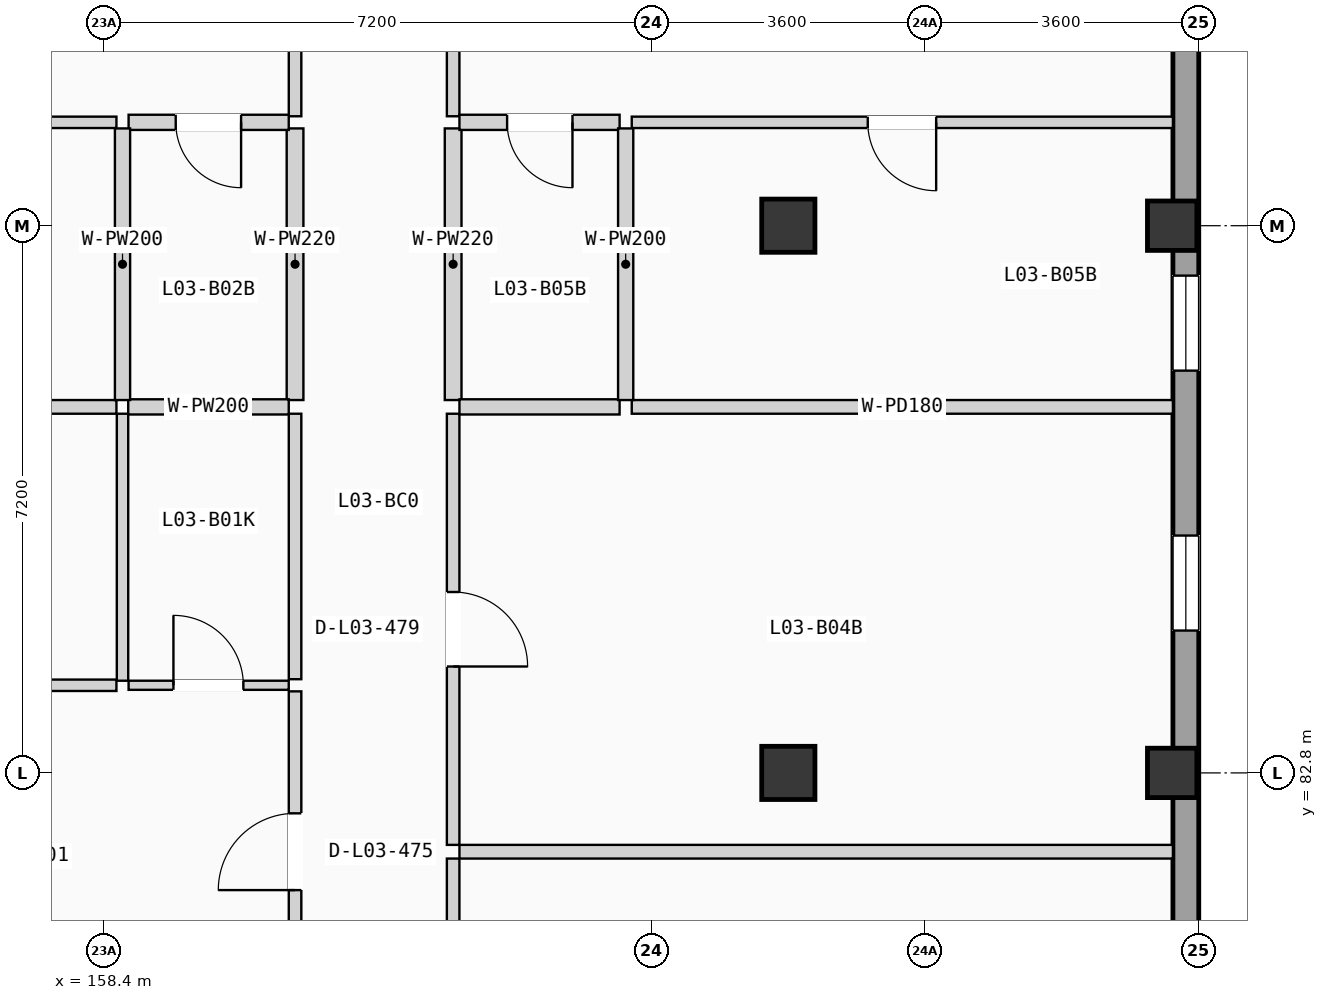
"""IFC4 building model, lengths in metres.
Left out: names, types, materials, properties, quantities, classifications, styles, units other than length and angle.
Written with IfcOpenShell. Run it as: python <this file> out.ifc"""

import sys

from ifc_helpers import new_model, si_unit, direction, frame, frame_2d, origin, origin_2d, place, context, subcontext, project, spatial, rectangle, extrude, element, fill, save


model = new_model("IFC4")
c1 = context("Model", 3, precision=1e-05, world=origin(), true_north=direction((0.0, 1.0)))
c2 = subcontext(c1, "Body", "Model", "MODEL_VIEW")
j1 = project(units=[si_unit("LENGTHUNIT", "METRE"), si_unit("PLANEANGLEUNIT", "RADIAN")], contexts=[c1])
p1 = place(None, origin())
s1 = spatial("IfcSite", under=j1, at=p1, CompositionType="ELEMENT")
p2 = place(p1, origin())
s2 = spatial("IfcBuilding", under=s1, at=p2, CompositionType="ELEMENT")
p3 = place(p2, frame((0.0, 0.0, 12.075)))
s3 = spatial("IfcBuildingStorey", under=s2, at=p3, CompositionType="ELEMENT", Elevation=12.075)
for number, where, z_axis, x_axis in (
    (1, (167.4, 82.8, 0.0), (0.0, 0.0, 1.0), (1.0, 0.0, 0.0)),
    (2, (167.4, 90.0, 0.0), (0.0, 0.0, 1.0), (1.0, 0.0, 0.0)),
):
    element("IfcColumn", number, at=place(p3, frame(where, z_axis=z_axis, x_axis=x_axis)), inside=s3, PredefinedType="COLUMN", context=c2, shape_type="SweptSolid", body=[
        extrude(rectangle(XDim=0.7, YDim=0.7, at=origin_2d()), origin(), (0.0, 0.0, 1.0), 3.15),
    ])
for number, where, z_axis, x_axis in (
    (3, (172.45, 82.8, 0.0), (0.0, 0.0, 1.0), (1.0, 0.0, 0.0)),
    (4, (172.45, 90.0, 0.0), (0.0, 0.0, 1.0), (1.0, 0.0, 0.0)),
):
    element("IfcColumn", number, at=place(p3, frame(where, z_axis=z_axis, x_axis=x_axis)), inside=s3, PredefinedType="COLUMN", context=c2, shape_type="SweptSolid", body=[
        extrude(rectangle(XDim=0.65, YDim=0.65, at=origin_2d()), origin(), (0.0, 0.0, 1.0), 3.15),
    ])
p4 = place(p3, frame((172.63, 68.74, 0.0), z_axis=(0.0, 0.0, 1.0), x_axis=(0.0, 1.0, 0.0)))
e5 = element("IfcWall", 5, at=p4, inside=s3, PredefinedType="SOLIDWALL", context=c2, shape_type="SweptSolid", body=[
    extrude(rectangle(XDim=49.72, YDim=0.34, at=frame_2d((24.86, 0.0))), origin(), (0.0, 0.0, 1.0), 2.89),
])
p5 = place(p4, frame((9.472, 0.0, 0.9)))
e6 = element("IfcOpeningElement", 6, at=p5, cuts=e5, PredefinedType="OPENING", context=c2, shape_type="SweptSolid", body=[
    extrude(rectangle(XDim=1.25, YDim=1.2, at=frame_2d((0.625, 0.6))), frame((0.0, 0.18, 0.0), z_axis=(0.0, -1.0, 0.0), x_axis=(1.0, 0.0, 0.0)), (0.0, 0.0, 1.0), 0.36),
])
p6 = place(p4, frame((15.933, 0.0, 0.855)))
e7 = element("IfcOpeningElement", 7, at=p6, cuts=e5, PredefinedType="OPENING", context=c2, shape_type="SweptSolid", body=[
    extrude(rectangle(XDim=1.25, YDim=1.35, at=frame_2d((0.625, 0.675))), frame((0.0, 0.18, 0.0), z_axis=(0.0, -1.0, 0.0), x_axis=(1.0, 0.0, 0.0)), (0.0, 0.0, 1.0), 0.36),
])
p7 = place(p4, frame((24.235, 0.0, 0.705)))
e8 = element("IfcOpeningElement", 8, at=p7, cuts=e5, PredefinedType="OPENING", context=c2, shape_type="SweptSolid", body=[
    extrude(rectangle(XDim=1.25, YDim=1.5, at=frame_2d((0.625, 0.75))), frame((0.0, 0.18, 0.0), z_axis=(0.0, -1.0, 0.0), x_axis=(1.0, 0.0, 0.0)), (0.0, 0.0, 1.0), 0.36),
])
p8 = place(p4, frame((19.353, 0.0, 0.555)))
e9 = element("IfcOpeningElement", 9, at=p8, cuts=e5, PredefinedType="OPENING", context=c2, shape_type="SweptSolid", body=[
    extrude(rectangle(XDim=1.25, YDim=1.65, at=frame_2d((0.625, 0.825))), frame((0.0, 0.18, 0.0), z_axis=(0.0, -1.0, 0.0), x_axis=(1.0, 0.0, 0.0)), (0.0, 0.0, 1.0), 0.36),
])
p9 = place(p4, frame((29.267, 0.0, 0.85)))
e10 = element("IfcOpeningElement", 10, at=p9, cuts=e5, PredefinedType="OPENING", context=c2, shape_type="SweptSolid", body=[
    extrude(rectangle(XDim=0.95, YDim=1.2, at=frame_2d((0.475, 0.6))), frame((0.0, 0.18, 0.0), z_axis=(0.0, -1.0, 0.0), x_axis=(1.0, 0.0, 0.0)), (0.0, 0.0, 1.0), 0.36),
])
p10 = place(p4, frame((36.694, 0.0, 0.9)))
e11 = element("IfcOpeningElement", 11, at=p10, cuts=e5, PredefinedType="OPENING", context=c2, shape_type="SweptSolid", body=[
    extrude(rectangle(XDim=1.35, YDim=1.2, at=frame_2d((0.675, 0.6))), frame((0.0, 0.18, 0.0), z_axis=(0.0, -1.0, 0.0), x_axis=(1.0, 0.0, 0.0)), (0.0, 0.0, 1.0), 0.36),
])
p11 = place(p4, frame((32.006, 0.0, 0.855)))
e12 = element("IfcOpeningElement", 12, at=p11, cuts=e5, PredefinedType="OPENING", context=c2, shape_type="SweptSolid", body=[
    extrude(rectangle(XDim=1.35, YDim=1.35, at=frame_2d((0.675, 0.675))), frame((0.0, 0.18, 0.0), z_axis=(0.0, -1.0, 0.0), x_axis=(1.0, 0.0, 0.0)), (0.0, 0.0, 1.0), 0.36),
])
p12 = place(p4, frame((40.038, 0.0, 0.705)))
e13 = element("IfcOpeningElement", 13, at=p12, cuts=e5, PredefinedType="OPENING", context=c2, shape_type="SweptSolid", body=[
    extrude(rectangle(XDim=1.35, YDim=1.5, at=frame_2d((0.675, 0.75))), frame((0.0, 0.18, 0.0), z_axis=(0.0, -1.0, 0.0), x_axis=(1.0, 0.0, 0.0)), (0.0, 0.0, 1.0), 0.36),
])
p13 = place(p3, frame((160.91, 79.653, 0.0), z_axis=(0.0, 0.0, 1.0), x_axis=(0.0, 1.0, 0.0)))
e14 = element("IfcWall", 14, at=p13, inside=s3, PredefinedType="PARTITIONING", context=c2, shape_type="SweptSolid", body=[
    extrude(rectangle(XDim=4.22, YDim=0.165, at=frame_2d((2.11, 0.0))), origin(), (0.0, 0.0, 1.0), 2.87),
])
p14 = place(p13, frame((1.605, 0.0, 0.0)))
e15 = element("IfcOpeningElement", 15, at=p14, cuts=e14, PredefinedType="OPENING", context=c2, shape_type="SweptSolid", body=[
    extrude(rectangle(XDim=1.01, YDim=2.11, at=frame_2d((0.505, 1.055))), frame((0.0, 0.093, 0.0), z_axis=(0.0, -1.0, 0.0), x_axis=(1.0, 0.0, 0.0)), (0.0, 0.0, 1.0), 0.185),
])
p15 = place(p3, frame((160.91, 84.033, 0.0), z_axis=(0.0, 0.0, 1.0), x_axis=(0.0, 1.0, 0.0)))
e16 = element("IfcWall", 16, at=p15, inside=s3, PredefinedType="PARTITIONING", context=c2, shape_type="SweptSolid", body=[
    extrude(rectangle(XDim=3.493, YDim=0.165, at=frame_2d((1.747, 0.0))), origin(), (0.0, 0.0, 1.0), 2.87),
])
p16 = place(p3, frame((160.91, 91.44, 0.0), z_axis=(0.0, 0.0, 1.0), x_axis=(0.0, 1.0, 0.0)))
e17 = element("IfcWall", 17, at=p16, inside=s3, PredefinedType="PARTITIONING", context=c2, shape_type="SweptSolid", body=[
    extrude(rectangle(XDim=4.32, YDim=0.165, at=frame_2d((2.16, 0.0))), origin(), (0.0, 0.0, 1.0), 2.87),
])
p17 = place(p16, frame((1.655, 0.0, 0.0)))
e18 = element("IfcOpeningElement", 18, at=p17, cuts=e17, PredefinedType="OPENING", context=c2, shape_type="SweptSolid", body=[
    extrude(rectangle(XDim=1.01, YDim=2.11, at=frame_2d((0.505, 1.055))), frame((0.0, 0.093, 0.0), z_axis=(0.0, -1.0, 0.0), x_axis=(1.0, 0.0, 0.0)), (0.0, 0.0, 1.0), 0.185),
])
p18 = place(p3, frame((160.91, 87.706, 0.0), z_axis=(0.0, 0.0, 1.0), x_axis=(0.0, 1.0, 0.0)))
e19 = element("IfcWall", 19, at=p18, inside=s3, PredefinedType="PLUMBINGWALL", context=c2, shape_type="SweptSolid", body=[
    extrude(rectangle(XDim=3.574, YDim=0.22, at=frame_2d((1.787, 0.0))), origin(), (0.0, 0.0, 1.0), 2.87),
])
p19 = place(p3, frame((162.99, 75.945, 0.0), z_axis=(0.0, 0.0, 1.0), x_axis=(0.0, 1.0, 0.0)))
e20 = element("IfcWall", 20, at=p19, inside=s3, PredefinedType="PARTITIONING", context=c2, shape_type="SweptSolid", body=[
    extrude(rectangle(XDim=5.728, YDim=0.165, at=frame_2d((2.864, 0.0))), origin(), (0.0, 0.0, 1.0), 2.87),
])
p20 = place(p19, frame((2.402, 0.0, 0.0)))
e21 = element("IfcOpeningElement", 21, at=p20, cuts=e20, PredefinedType="OPENING", context=c2, shape_type="SweptSolid", body=[
    extrude(rectangle(XDim=0.98, YDim=2.08, at=frame_2d((0.49, 1.04))), frame((0.0, 0.093, 0.0), z_axis=(0.0, -1.0, 0.0), x_axis=(1.0, 0.0, 0.0)), (0.0, 0.0, 1.0), 0.185),
])
p21 = place(p3, frame((162.99, 81.853, 0.0), z_axis=(0.0, 0.0, 1.0), x_axis=(0.0, 1.0, 0.0)))
e22 = element("IfcWall", 22, at=p21, inside=s3, PredefinedType="PARTITIONING", context=c2, shape_type="SweptSolid", body=[
    extrude(rectangle(XDim=5.673, YDim=0.165, at=frame_2d((2.836, 0.0))), origin(), (0.0, 0.0, 1.0), 2.87),
])
p22 = place(p21, frame((2.347, 0.0, 0.0)))
e23 = element("IfcOpeningElement", 23, at=p22, cuts=e22, PredefinedType="OPENING", context=c2, shape_type="SweptSolid", body=[
    extrude(rectangle(XDim=0.98, YDim=2.08, at=frame_2d((0.49, 1.04))), frame((0.0, 0.093, 0.0), z_axis=(0.0, -1.0, 0.0), x_axis=(1.0, 0.0, 0.0)), (0.0, 0.0, 1.0), 0.185),
])
p23 = place(p3, frame((162.99, 91.44, 0.0), z_axis=(0.0, 0.0, 1.0), x_axis=(0.0, 1.0, 0.0)))
e24 = element("IfcWall", 24, at=p23, inside=s3, PredefinedType="PARTITIONING", context=c2, shape_type="SweptSolid", body=[
    extrude(rectangle(XDim=4.32, YDim=0.165, at=frame_2d((2.16, 0.0))), origin(), (0.0, 0.0, 1.0), 2.87),
])
p24 = place(p23, frame((1.655, 0.0, 0.0)))
e25 = element("IfcOpeningElement", 25, at=p24, cuts=e24, PredefinedType="OPENING", context=c2, shape_type="SweptSolid", body=[
    extrude(rectangle(XDim=1.01, YDim=2.11, at=frame_2d((0.505, 1.055))), frame((0.0, 0.093, 0.0), z_axis=(0.0, -1.0, 0.0), x_axis=(1.0, 0.0, 0.0)), (0.0, 0.0, 1.0), 0.185),
])
p25 = place(p3, frame((162.99, 87.706, 0.0), z_axis=(0.0, 0.0, 1.0), x_axis=(0.0, 1.0, 0.0)))
e26 = element("IfcWall", 26, at=p25, inside=s3, PredefinedType="PLUMBINGWALL", context=c2, shape_type="SweptSolid", body=[
    extrude(rectangle(XDim=3.574, YDim=0.22, at=frame_2d((1.787, 0.0))), origin(), (0.0, 0.0, 1.0), 2.87),
])
p26 = place(p3, frame((158.72, 83.953, 0.0), z_axis=(0.0, 0.0, 1.0), x_axis=(1.0, 0.0, 0.0)))
e27 = element("IfcWall", 27, at=p26, inside=s3, PredefinedType="PARTITIONING", context=c2, shape_type="SweptSolid", body=[
    extrude(rectangle(XDim=2.107, YDim=0.12, at=frame_2d((1.053, 0.0))), origin(), (0.0, 0.0, 1.0), 2.87),
])
p27 = place(p26, frame((0.59, 0.0, 0.0)))
e28 = element("IfcOpeningElement", 28, at=p27, cuts=e27, PredefinedType="OPENING", context=c2, shape_type="SweptSolid", body=[
    extrude(rectangle(XDim=0.92, YDim=2.02, at=frame_2d((0.46, 1.01))), frame((0.0, 0.07, 0.0), z_axis=(0.0, -1.0, 0.0), x_axis=(1.0, 0.0, 0.0)), (0.0, 0.0, 1.0), 0.14),
])
p28 = place(p3, frame((151.54, 83.953, 0.0), z_axis=(0.0, 0.0, 1.0), x_axis=(1.0, 0.0, 0.0)))
e29 = element("IfcWall", 29, at=p28, inside=s3, PredefinedType="PARTITIONING", context=c2, shape_type="SweptSolid", body=[
    extrude(rectangle(XDim=7.02, YDim=0.15, at=frame_2d((3.51, 0.0))), origin(), (0.0, 0.0, 1.0), 2.87),
])
p29 = place(p28, frame((3.015, 0.0, 0.0)))
e30 = element("IfcOpeningElement", 30, at=p29, cuts=e29, PredefinedType="OPENING", context=c2, shape_type="SweptSolid", body=[
    extrude(rectangle(XDim=1.0, YDim=2.06, at=frame_2d((0.5, 1.03))), frame((0.0, 0.085, 0.0), z_axis=(0.0, -1.0, 0.0), x_axis=(1.0, 0.0, 0.0)), (0.0, 0.0, 1.0), 0.17),
])
p30 = place(p3, frame((158.64, 84.013, 0.0), z_axis=(0.0, 0.0, 1.0), x_axis=(0.0, 1.0, 0.0)))
e31 = element("IfcWall", 31, at=p30, inside=s3, PredefinedType="PARTITIONING", context=c2, shape_type="SweptSolid", body=[
    extrude(rectangle(XDim=3.513, YDim=0.15, at=frame_2d((1.756, 0.0))), origin(), (0.0, 0.0, 1.0), 2.87),
])
p31 = place(p3, frame((158.715, 87.616, 0.0), z_axis=(0.0, 0.0, 1.0), x_axis=(1.0, 0.0, 0.0)))
e32 = element("IfcWall", 32, at=p31, inside=s3, PredefinedType="PLUMBINGWALL", context=c2, shape_type="SweptSolid", body=[
    extrude(rectangle(XDim=2.112, YDim=0.2, at=frame_2d((1.056, 0.0))), origin(), (0.0, 0.0, 1.0), 2.87),
])
p32 = place(p3, frame((151.54, 87.616, 0.0), z_axis=(0.0, 0.0, 1.0), x_axis=(1.0, 0.0, 0.0)))
e33 = element("IfcWall", 33, at=p32, inside=s3, PredefinedType="PARTITIONING", context=c2, shape_type="SweptSolid", body=[
    extrude(rectangle(XDim=7.02, YDim=0.18, at=frame_2d((3.51, 0.0))), origin(), (0.0, 0.0, 1.0), 2.87),
])
p33 = place(p3, frame((158.72, 91.36, 0.0), z_axis=(0.0, 0.0, 1.0), x_axis=(1.0, 0.0, 0.0)))
e34 = element("IfcWall", 34, at=p33, inside=s3, PredefinedType="PLUMBINGWALL", context=c2, shape_type="SweptSolid", body=[
    extrude(rectangle(XDim=2.107, YDim=0.2, at=frame_2d((1.053, 0.0))), origin(), (0.0, 0.0, 1.0), 2.87),
])
p34 = place(p33, frame((0.62, 0.0, 0.0)))
e35 = element("IfcOpeningElement", 35, at=p34, cuts=e34, PredefinedType="OPENING", context=c2, shape_type="SweptSolid", body=[
    extrude(rectangle(XDim=0.86, YDim=2.0, at=frame_2d((0.43, 1.0))), frame((0.0, 0.11, 0.0), z_axis=(0.0, -1.0, 0.0), x_axis=(1.0, 0.0, 0.0)), (0.0, 0.0, 1.0), 0.22),
])
p35 = place(p3, frame((151.54, 91.36, 0.0), z_axis=(0.0, 0.0, 1.0), x_axis=(1.0, 0.0, 0.0)))
e36 = element("IfcWall", 36, at=p35, inside=s3, PredefinedType="PARTITIONING", context=c2, shape_type="SweptSolid", body=[
    extrude(rectangle(XDim=7.02, YDim=0.15, at=frame_2d((3.51, 0.0))), origin(), (0.0, 0.0, 1.0), 2.87),
])
p36 = place(p35, frame((3.045, 0.0, 0.0)))
e37 = element("IfcOpeningElement", 37, at=p36, cuts=e36, PredefinedType="OPENING", context=c2, shape_type="SweptSolid", body=[
    extrude(rectangle(XDim=0.94, YDim=2.06, at=frame_2d((0.47, 1.03))), frame((0.0, 0.085, 0.0), z_axis=(0.0, -1.0, 0.0), x_axis=(1.0, 0.0, 0.0)), (0.0, 0.0, 1.0), 0.17),
])
p37 = place(p3, frame((158.64, 87.706, 0.0), z_axis=(0.0, 0.0, 1.0), x_axis=(0.0, 1.0, 0.0)))
e38 = element("IfcWall", 38, at=p37, inside=s3, PredefinedType="PLUMBINGWALL", context=c2, shape_type="SweptSolid", body=[
    extrude(rectangle(XDim=3.574, YDim=0.2, at=frame_2d((1.787, 0.0))), origin(), (0.0, 0.0, 1.0), 2.87),
])
p38 = place(p3, frame((163.073, 81.763, 0.0), z_axis=(0.0, 0.0, 1.0), x_axis=(1.0, 0.0, 0.0)))
e39 = element("IfcWall", 39, at=p38, inside=s3, PredefinedType="PARTITIONING", context=c2, shape_type="SweptSolid", body=[
    extrude(rectangle(XDim=9.387, YDim=0.18, at=frame_2d((4.693, 0.0))), origin(), (0.0, 0.0, 1.0), 2.87),
])
p39 = place(p3, frame((163.073, 87.616, 0.0), z_axis=(0.0, 0.0, 1.0), x_axis=(1.0, 0.0, 0.0)))
e40 = element("IfcWall", 40, at=p39, inside=s3, PredefinedType="PLUMBINGWALL", context=c2, shape_type="SweptSolid", body=[
    extrude(rectangle(XDim=2.107, YDim=0.2, at=frame_2d((1.053, 0.0))), origin(), (0.0, 0.0, 1.0), 2.87),
])
p40 = place(p3, frame((165.34, 87.616, 0.0), z_axis=(0.0, 0.0, 1.0), x_axis=(1.0, 0.0, 0.0)))
e41 = element("IfcWall", 41, at=p40, inside=s3, PredefinedType="PARTITIONING", context=c2, shape_type="SweptSolid", body=[
    extrude(rectangle(XDim=7.12, YDim=0.18, at=frame_2d((3.56, 0.0))), origin(), (0.0, 0.0, 1.0), 2.87),
])
p41 = place(p3, frame((163.073, 91.36, 0.0), z_axis=(0.0, 0.0, 1.0), x_axis=(1.0, 0.0, 0.0)))
e42 = element("IfcWall", 42, at=p41, inside=s3, PredefinedType="PLUMBINGWALL", context=c2, shape_type="SweptSolid", body=[
    extrude(rectangle(XDim=2.107, YDim=0.2, at=frame_2d((1.053, 0.0))), origin(), (0.0, 0.0, 1.0), 2.87),
])
p42 = place(p41, frame((0.627, 0.0, 0.0)))
e43 = element("IfcOpeningElement", 43, at=p42, cuts=e42, PredefinedType="OPENING", context=c2, shape_type="SweptSolid", body=[
    extrude(rectangle(XDim=0.86, YDim=2.0, at=frame_2d((0.43, 1.0))), frame((0.0, 0.11, 0.0), z_axis=(0.0, -1.0, 0.0), x_axis=(1.0, 0.0, 0.0)), (0.0, 0.0, 1.0), 0.22),
])
p43 = place(p3, frame((165.34, 91.36, 0.0), z_axis=(0.0, 0.0, 1.0), x_axis=(1.0, 0.0, 0.0)))
e44 = element("IfcWall", 44, at=p43, inside=s3, PredefinedType="PARTITIONING", context=c2, shape_type="SweptSolid", body=[
    extrude(rectangle(XDim=7.12, YDim=0.15, at=frame_2d((3.56, 0.0))), origin(), (0.0, 0.0, 1.0), 2.87),
])
p44 = place(p43, frame((3.105, 0.0, 0.0)))
e45 = element("IfcOpeningElement", 45, at=p44, cuts=e44, PredefinedType="OPENING", context=c2, shape_type="SweptSolid", body=[
    extrude(rectangle(XDim=0.9, YDim=2.04, at=frame_2d((0.45, 1.02))), frame((0.0, 0.085, 0.0), z_axis=(0.0, -1.0, 0.0), x_axis=(1.0, 0.0, 0.0)), (0.0, 0.0, 1.0), 0.17),
])
p45 = place(p3, frame((165.26, 87.706, 0.0), z_axis=(0.0, 0.0, 1.0), x_axis=(0.0, 1.0, 0.0)))
e46 = element("IfcWall", 46, at=p45, inside=s3, PredefinedType="PLUMBINGWALL", context=c2, shape_type="SweptSolid", body=[
    extrude(rectangle(XDim=3.574, YDim=0.2, at=frame_2d((1.787, 0.0))), origin(), (0.0, 0.0, 1.0), 2.87),
])
p46 = place(p6, origin())
e47 = element("IfcWindow", 47, at=p46, inside=s3, PartitioningType="SINGLE_PANEL", PredefinedType="WINDOW", context=c2, shape_type="SweptSolid", body=[
    extrude(rectangle(XDim=1.25, YDim=1.35, at=frame_2d((0.625, 0.675))), frame((0.0, 0.03, 0.0), z_axis=(0.0, -1.0, 0.0), x_axis=(1.0, 0.0, 0.0)), (0.0, 0.0, 1.0), 0.06),
])
fill(e7, e47)
p47 = place(p8, origin())
e48 = element("IfcWindow", 48, at=p47, inside=s3, PartitioningType="SINGLE_PANEL", PredefinedType="WINDOW", context=c2, shape_type="SweptSolid", body=[
    extrude(rectangle(XDim=1.25, YDim=1.65, at=frame_2d((0.625, 0.825))), frame((0.0, 0.03, 0.0), z_axis=(0.0, -1.0, 0.0), x_axis=(1.0, 0.0, 0.0)), (0.0, 0.0, 1.0), 0.06),
])
fill(e9, e48)
p48 = place(p14, origin())
e49 = element("IfcDoor", 49, at=p48, inside=s3, OperationType="SINGLE_SWING_LEFT", PredefinedType="DOOR", context=c2, shape_type="SweptSolid", body=[
    extrude(rectangle(XDim=1.01, YDim=2.11, at=frame_2d((0.505, 1.055))), frame((0.0, 0.025, 0.0), z_axis=(0.0, -1.0, 0.0), x_axis=(1.0, 0.0, 0.0)), (0.0, 0.0, 1.0), 0.05),
])
fill(e15, e49)
p49 = place(p22, frame((0.98, 0.0, 0.0), z_axis=(0.0, 0.0, 1.0), x_axis=(-1.0, 0.0, 0.0)))
e50 = element("IfcDoor", 50, at=p49, inside=s3, OperationType="SINGLE_SWING_LEFT", PredefinedType="DOOR", context=c2, shape_type="SweptSolid", body=[
    extrude(rectangle(XDim=0.98, YDim=2.08, at=frame_2d((0.49, 1.04))), frame((0.0, 0.025, 0.0), z_axis=(0.0, -1.0, 0.0), x_axis=(1.0, 0.0, 0.0)), (0.0, 0.0, 1.0), 0.05),
])
fill(e23, e50)
p50 = place(p27, origin())
e51 = element("IfcDoor", 51, at=p50, inside=s3, OperationType="SINGLE_SWING_LEFT", PredefinedType="DOOR", context=c2, shape_type="SweptSolid", body=[
    extrude(rectangle(XDim=0.92, YDim=2.02, at=frame_2d((0.46, 1.01))), frame((0.0, 0.025, 0.0), z_axis=(0.0, -1.0, 0.0), x_axis=(1.0, 0.0, 0.0)), (0.0, 0.0, 1.0), 0.05),
])
fill(e28, e51)
p51 = place(p34, frame((0.86, 0.0, 0.0), z_axis=(0.0, 0.0, 1.0), x_axis=(-1.0, 0.0, 0.0)))
e52 = element("IfcDoor", 52, at=p51, inside=s3, OperationType="SINGLE_SWING_RIGHT", PredefinedType="DOOR", context=c2, shape_type="SweptSolid", body=[
    extrude(rectangle(XDim=0.86, YDim=2.0, at=frame_2d((0.43, 1.0))), frame((0.0, 0.025, 0.0), z_axis=(0.0, -1.0, 0.0), x_axis=(1.0, 0.0, 0.0)), (0.0, 0.0, 1.0), 0.05),
])
fill(e35, e52)
p52 = place(p42, frame((0.86, 0.0, 0.0), z_axis=(0.0, 0.0, 1.0), x_axis=(-1.0, 0.0, 0.0)))
e53 = element("IfcDoor", 53, at=p52, inside=s3, OperationType="SINGLE_SWING_RIGHT", PredefinedType="DOOR", context=c2, shape_type="SweptSolid", body=[
    extrude(rectangle(XDim=0.86, YDim=2.0, at=frame_2d((0.43, 1.0))), frame((0.0, 0.025, 0.0), z_axis=(0.0, -1.0, 0.0), x_axis=(1.0, 0.0, 0.0)), (0.0, 0.0, 1.0), 0.05),
])
fill(e43, e53)
p53 = place(p44, frame((0.9, 0.0, 0.0), z_axis=(0.0, 0.0, 1.0), x_axis=(-1.0, 0.0, 0.0)))
e54 = element("IfcDoor", 54, at=p53, inside=s3, OperationType="SINGLE_SWING_RIGHT", PredefinedType="DOOR", context=c2, shape_type="SweptSolid", body=[
    extrude(rectangle(XDim=0.9, YDim=2.04, at=frame_2d((0.45, 1.02))), frame((0.0, 0.025, 0.0), z_axis=(0.0, -1.0, 0.0), x_axis=(1.0, 0.0, 0.0)), (0.0, 0.0, 1.0), 0.05),
])
fill(e45, e54)
save(model, sys.argv[1])
